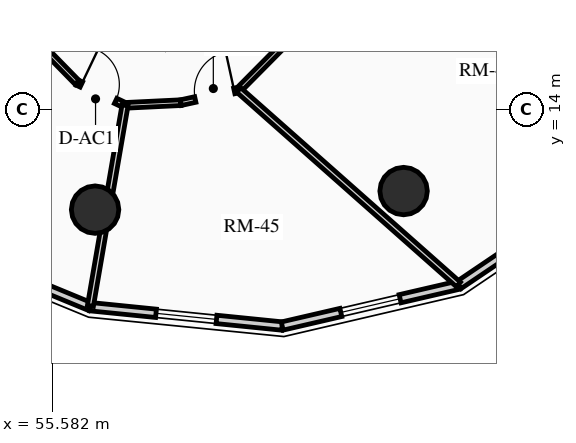
"""IFC4 building model, lengths in metres.
Left out: names, types, materials, properties, quantities, classifications, styles, units other than length and angle.
Written with IfcOpenShell. Run it as: python <this file> out.ifc"""

import sys

from ifc_helpers import new_model, si_unit, direction, frame, frame_2d, origin, origin_2d, place, context, subcontext, project, spatial, rectangle, circle, extrude, source, transform, mapped, element, fill, save


model = new_model("IFC4")
c1 = context("Model", 3, precision=1e-05, world=origin(), true_north=direction((0.0, 1.0)))
c2 = subcontext(c1, "Body", "Model", "MODEL_VIEW")
j1 = project(units=[si_unit("LENGTHUNIT", "METRE"), si_unit("PLANEANGLEUNIT", "RADIAN")], contexts=[c1])
p1 = place(None, origin())
s1 = spatial("IfcSite", under=j1, at=p1, CompositionType="ELEMENT")
p2 = place(p1, origin())
s2 = spatial("IfcBuilding", under=s1, at=p2, CompositionType="ELEMENT")
p3 = place(p2, frame((0.0, 0.0, 154.51)))
s3 = spatial("IfcBuildingStorey", under=s2, at=p3, CompositionType="ELEMENT", Elevation=154.51)
for number, where, z_axis, x_axis in (
    (1, (56.709, 11.365, 0.0), (0.0, 0.0, 1.0), (1.0, 0.0, 0.0)),
    (2, (64.827, 11.854, 0.0), (0.0, 0.0, 1.0), (1.0, 0.0, 0.0)),
):
    element("IfcColumn", number, at=place(p3, frame(where, z_axis=z_axis, x_axis=x_axis)), inside=s3, PredefinedType="USERDEFINED", context=c2, shape_type="SweptSolid", body=[
        extrude(circle(Radius=0.625, at=origin_2d()), origin(), (0.0, 0.0, 1.0), 2.91),
    ])
p4 = place(p3, frame((56.582, 8.811, 0.0), z_axis=(0.0, 0.0, 1.0), x_axis=(-0.924528197738, 0.38111364655, 0.0)))
e3 = element("IfcWall", 3, at=p4, inside=s3, PredefinedType="SOLIDWALL", context=c2, shape_type="SweptSolid", body=[
    extrude(rectangle(XDim=5.366, YDim=0.22, at=frame_2d((2.683, 0.0))), origin(), (0.0, 0.0, 1.0), 2.245),
])
p5 = place(p3, frame((61.633, 8.302, 0.0), z_axis=(0.0, 0.0, 1.0), x_axis=(-0.994959267396, 0.100279889424, 0.0)))
e4 = element("IfcWall", 4, at=p5, inside=s3, PredefinedType="SOLIDWALL", context=c2, shape_type="SweptSolid", body=[
    extrude(rectangle(XDim=5.076, YDim=0.22, at=frame_2d((2.538, 0.0))), origin(), (0.0, 0.0, 1.0), 2.245),
])
m1 = source(origin(), c2, "Body", "SweptSolid", [
    extrude(rectangle(XDim=1.6, YDim=1.3, at=frame_2d((0.8, 0.65))), frame((0.0, 0.12, 0.0), z_axis=(0.0, -1.0, 0.0), x_axis=(1.0, 0.0, 0.0)), (0.0, 0.0, 1.0), 0.24),
])
p6 = place(p5, frame((1.738, 0.0, 0.65)))
e5 = element("IfcOpeningElement", 5, at=p6, cuts=e4, PredefinedType="OPENING", context=c2, shape_type="MappedRepresentation", body=[
    mapped(m1, transform((0.0, 0.0, 0.0), x_axis=(1.0, 0.0, 0.0), y_axis=(0.0, 1.0, 0.0), z_axis=(0.0, 0.0, 1.0), scale=1.0)),
])
p7 = place(p3, frame((66.279, 9.378, 0.0), z_axis=(0.0, 0.0, 1.0), x_axis=(-0.974206226622, -0.225659540039, 0.0)))
e6 = element("IfcWall", 6, at=p7, inside=s3, PredefinedType="SOLIDWALL", context=c2, shape_type="SweptSolid", body=[
    extrude(rectangle(XDim=4.769, YDim=0.22, at=frame_2d((2.385, 0.0))), origin(), (0.0, 0.0, 1.0), 2.245),
])
p8 = place(p7, frame((1.585, 0.0, 0.65)))
e7 = element("IfcOpeningElement", 7, at=p8, cuts=e6, PredefinedType="OPENING", context=c2, shape_type="MappedRepresentation", body=[
    mapped(m1, transform((0.0, 0.0, 0.0), x_axis=(1.0, 0.0, 0.0), y_axis=(0.0, 1.0, 0.0), z_axis=(0.0, 0.0, 1.0), scale=1.0)),
])
p9 = place(p3, frame((70.065, 11.935, 0.0), z_axis=(0.0, 0.0, 1.0), x_axis=(-0.828739009952, -0.559635286042, 0.0)))
e8 = element("IfcWall", 8, at=p9, inside=s3, PredefinedType="SOLIDWALL", context=c2, shape_type="SweptSolid", body=[
    extrude(rectangle(XDim=4.569, YDim=0.22, at=frame_2d((2.284, 0.0))), origin(), (0.0, 0.0, 1.0), 2.245),
])
p10 = place(p3, frame((52.02, 19.02, 0.0), z_axis=(0.0, 0.0, 1.0), x_axis=(0.699456449804, -0.71467522332, 0.0)))
e9 = element("IfcWall", 9, at=p10, inside=s3, PredefinedType="PARTITIONING", context=c2, shape_type="SweptSolid", body=[
    extrude(rectangle(XDim=6.032, YDim=0.15, at=frame_2d((3.016, 0.0))), origin(), (0.0, 0.0, 1.0), 2.245),
])
p11 = place(p3, frame((56.239, 14.709, 0.0), z_axis=(0.0, 0.0, 1.0), x_axis=(0.902374219125, -0.430953325383, 0.0)))
e10 = element("IfcWall", 10, at=p11, inside=s3, PredefinedType="PARTITIONING", context=c2, shape_type="SweptSolid", body=[
    extrude(rectangle(XDim=1.394, YDim=0.15, at=frame_2d((0.697, 0.0))), origin(), (0.0, 0.0, 1.0), 2.245),
])
m2 = source(origin(), c2, "Body", "SweptSolid", [
    extrude(rectangle(XDim=1.0, YDim=2.015, at=frame_2d((0.5, 1.007))), frame((0.0, 0.085, 0.0), z_axis=(0.0, -1.0, 0.0), x_axis=(1.0, 0.0, 0.0)), (0.0, 0.0, 1.0), 0.17),
])
p12 = place(p11, frame((0.12, 0.0, 0.0)))
e11 = element("IfcOpeningElement", 11, at=p12, cuts=e10, PredefinedType="OPENING", context=c2, shape_type="MappedRepresentation", body=[
    mapped(m2, transform((0.0, 0.0, 0.0), x_axis=(1.0, 0.0, 0.0), y_axis=(0.0, 1.0, 0.0), z_axis=(0.0, 0.0, 1.0), scale=1.0)),
])
p13 = place(p3, frame((57.497, 14.109, 0.0), z_axis=(0.0, 0.0, 1.0), x_axis=(0.998828286318, 0.048394777109, 0.0)))
e12 = element("IfcWall", 12, at=p13, inside=s3, PredefinedType="PARTITIONING", context=c2, shape_type="SweptSolid", body=[
    extrude(rectangle(XDim=1.468, YDim=0.15, at=frame_2d((0.734, 0.0))), origin(), (0.0, 0.0, 1.0), 2.245),
])
p14 = place(p3, frame((58.963, 14.18, 0.0), z_axis=(0.0, 0.0, 1.0), x_axis=(0.976826524015, 0.214032572243, 0.0)))
e13 = element("IfcWall", 13, at=p14, inside=s3, PredefinedType="PARTITIONING", context=c2, shape_type="SweptSolid", body=[
    extrude(rectangle(XDim=1.562, YDim=0.15, at=frame_2d((0.781, 0.0))), origin(), (0.0, 0.0, 1.0), 2.245),
])
m3 = source(origin(), c2, "Body", "SweptSolid", [
    extrude(rectangle(XDim=1.05, YDim=2.015, at=frame_2d((0.525, 1.007))), frame((0.0, 0.085, 0.0), z_axis=(0.0, -1.0, 0.0), x_axis=(1.0, 0.0, 0.0)), (0.0, 0.0, 1.0), 0.17),
])
p15 = place(p14, frame((0.392, 0.0, 0.0)))
e14 = element("IfcOpeningElement", 14, at=p15, cuts=e13, PredefinedType="OPENING", context=c2, shape_type="MappedRepresentation", body=[
    mapped(m3, transform((0.0, 0.0, 0.0), x_axis=(1.0, 0.0, 0.0), y_axis=(0.0, 1.0, 0.0), z_axis=(0.0, 0.0, 1.0), scale=1.0)),
])
p16 = place(p3, frame((60.488, 14.514, 0.0), z_axis=(0.0, 0.0, 1.0), x_axis=(0.703880260405, 0.71031864611, 0.0)))
e15 = element("IfcWall", 15, at=p16, inside=s3, PredefinedType="PARTITIONING", context=c2, shape_type="SweptSolid", body=[
    extrude(rectangle(XDim=3.261, YDim=0.15, at=frame_2d((1.63, 0.0))), origin(), (0.0, 0.0, 1.0), 2.245),
])
p17 = place(p3, frame((57.497, 14.109, 0.0), z_axis=(0.0, 0.0, 1.0), x_axis=(-0.170109923992, -0.985425092922, 0.0)))
e16 = element("IfcWall", 16, at=p17, inside=s3, PredefinedType="PARTITIONING", context=c2, shape_type="SweptSolid", body=[
    extrude(rectangle(XDim=5.356, YDim=0.16, at=frame_2d((2.678, 0.0))), origin(), (0.0, 0.0, 1.0), 2.245),
])
p18 = place(p3, frame((60.488, 14.514, 0.0), z_axis=(0.0, 0.0, 1.0), x_axis=(0.748740614849, -0.662863101761, 0.0)))
e17 = element("IfcWall", 17, at=p18, inside=s3, PredefinedType="PARTITIONING", context=c2, shape_type="SweptSolid", body=[
    extrude(rectangle(XDim=7.721, YDim=0.16, at=frame_2d((3.861, 0.0))), origin(), (0.0, 0.0, 1.0), 2.245),
])
m4 = source(origin(), c2, "Body", "SweptSolid", [
    extrude(rectangle(XDim=1.6, YDim=1.3, at=frame_2d((0.8, 0.65))), frame((0.0, 0.03, 0.0), z_axis=(0.0, -1.0, 0.0), x_axis=(1.0, 0.0, 0.0)), (0.0, 0.0, 1.0), 0.06),
])
p19 = place(p6, origin())
e18 = element("IfcWindow", 18, at=p19, inside=s3, PartitioningType="SINGLE_PANEL", PredefinedType="WINDOW", context=c2, shape_type="MappedRepresentation", body=[
    mapped(m4, transform((0.0, 0.0, 0.0), x_axis=(1.0, 0.0, 0.0), y_axis=(0.0, 1.0, 0.0), z_axis=(0.0, 0.0, 1.0), scale=1.0)),
])
fill(e5, e18)
p20 = place(p8, origin())
e19 = element("IfcWindow", 19, at=p20, inside=s3, PartitioningType="SINGLE_PANEL", PredefinedType="WINDOW", context=c2, shape_type="MappedRepresentation", body=[
    mapped(m4, transform((0.0, 0.0, 0.0), x_axis=(1.0, 0.0, 0.0), y_axis=(0.0, 1.0, 0.0), z_axis=(0.0, 0.0, 1.0), scale=1.0)),
])
fill(e7, e19)
m5 = source(origin(), c2, "Body", "SweptSolid", [
    extrude(rectangle(XDim=1.0, YDim=2.015, at=frame_2d((0.5, 1.007))), frame((0.0, 0.025, 0.0), z_axis=(0.0, -1.0, 0.0), x_axis=(1.0, 0.0, 0.0)), (0.0, 0.0, 1.0), 0.05),
])
p21 = place(p12, origin())
e20 = element("IfcDoor", 20, at=p21, inside=s3, OperationType="SINGLE_SWING_LEFT", PredefinedType="DOOR", context=c2, shape_type="MappedRepresentation", body=[
    mapped(m5, transform((0.0, 0.0, 0.0), x_axis=(1.0, 0.0, 0.0), y_axis=(0.0, 1.0, 0.0), z_axis=(0.0, 0.0, 1.0), scale=1.0)),
])
fill(e11, e20)
m6 = source(origin(), c2, "Body", "SweptSolid", [
    extrude(rectangle(XDim=1.05, YDim=2.015, at=frame_2d((0.525, 1.007))), frame((0.0, 0.025, 0.0), z_axis=(0.0, -1.0, 0.0), x_axis=(1.0, 0.0, 0.0)), (0.0, 0.0, 1.0), 0.05),
])
p22 = place(p15, origin())
e21 = element("IfcDoor", 21, at=p22, inside=s3, OperationType="SINGLE_SWING_RIGHT", PredefinedType="DOOR", context=c2, shape_type="MappedRepresentation", body=[
    mapped(m6, transform((0.0, 0.0, 0.0), x_axis=(1.0, 0.0, 0.0), y_axis=(0.0, 1.0, 0.0), z_axis=(0.0, 0.0, 1.0), scale=1.0)),
])
fill(e14, e21)
save(model, sys.argv[1])
